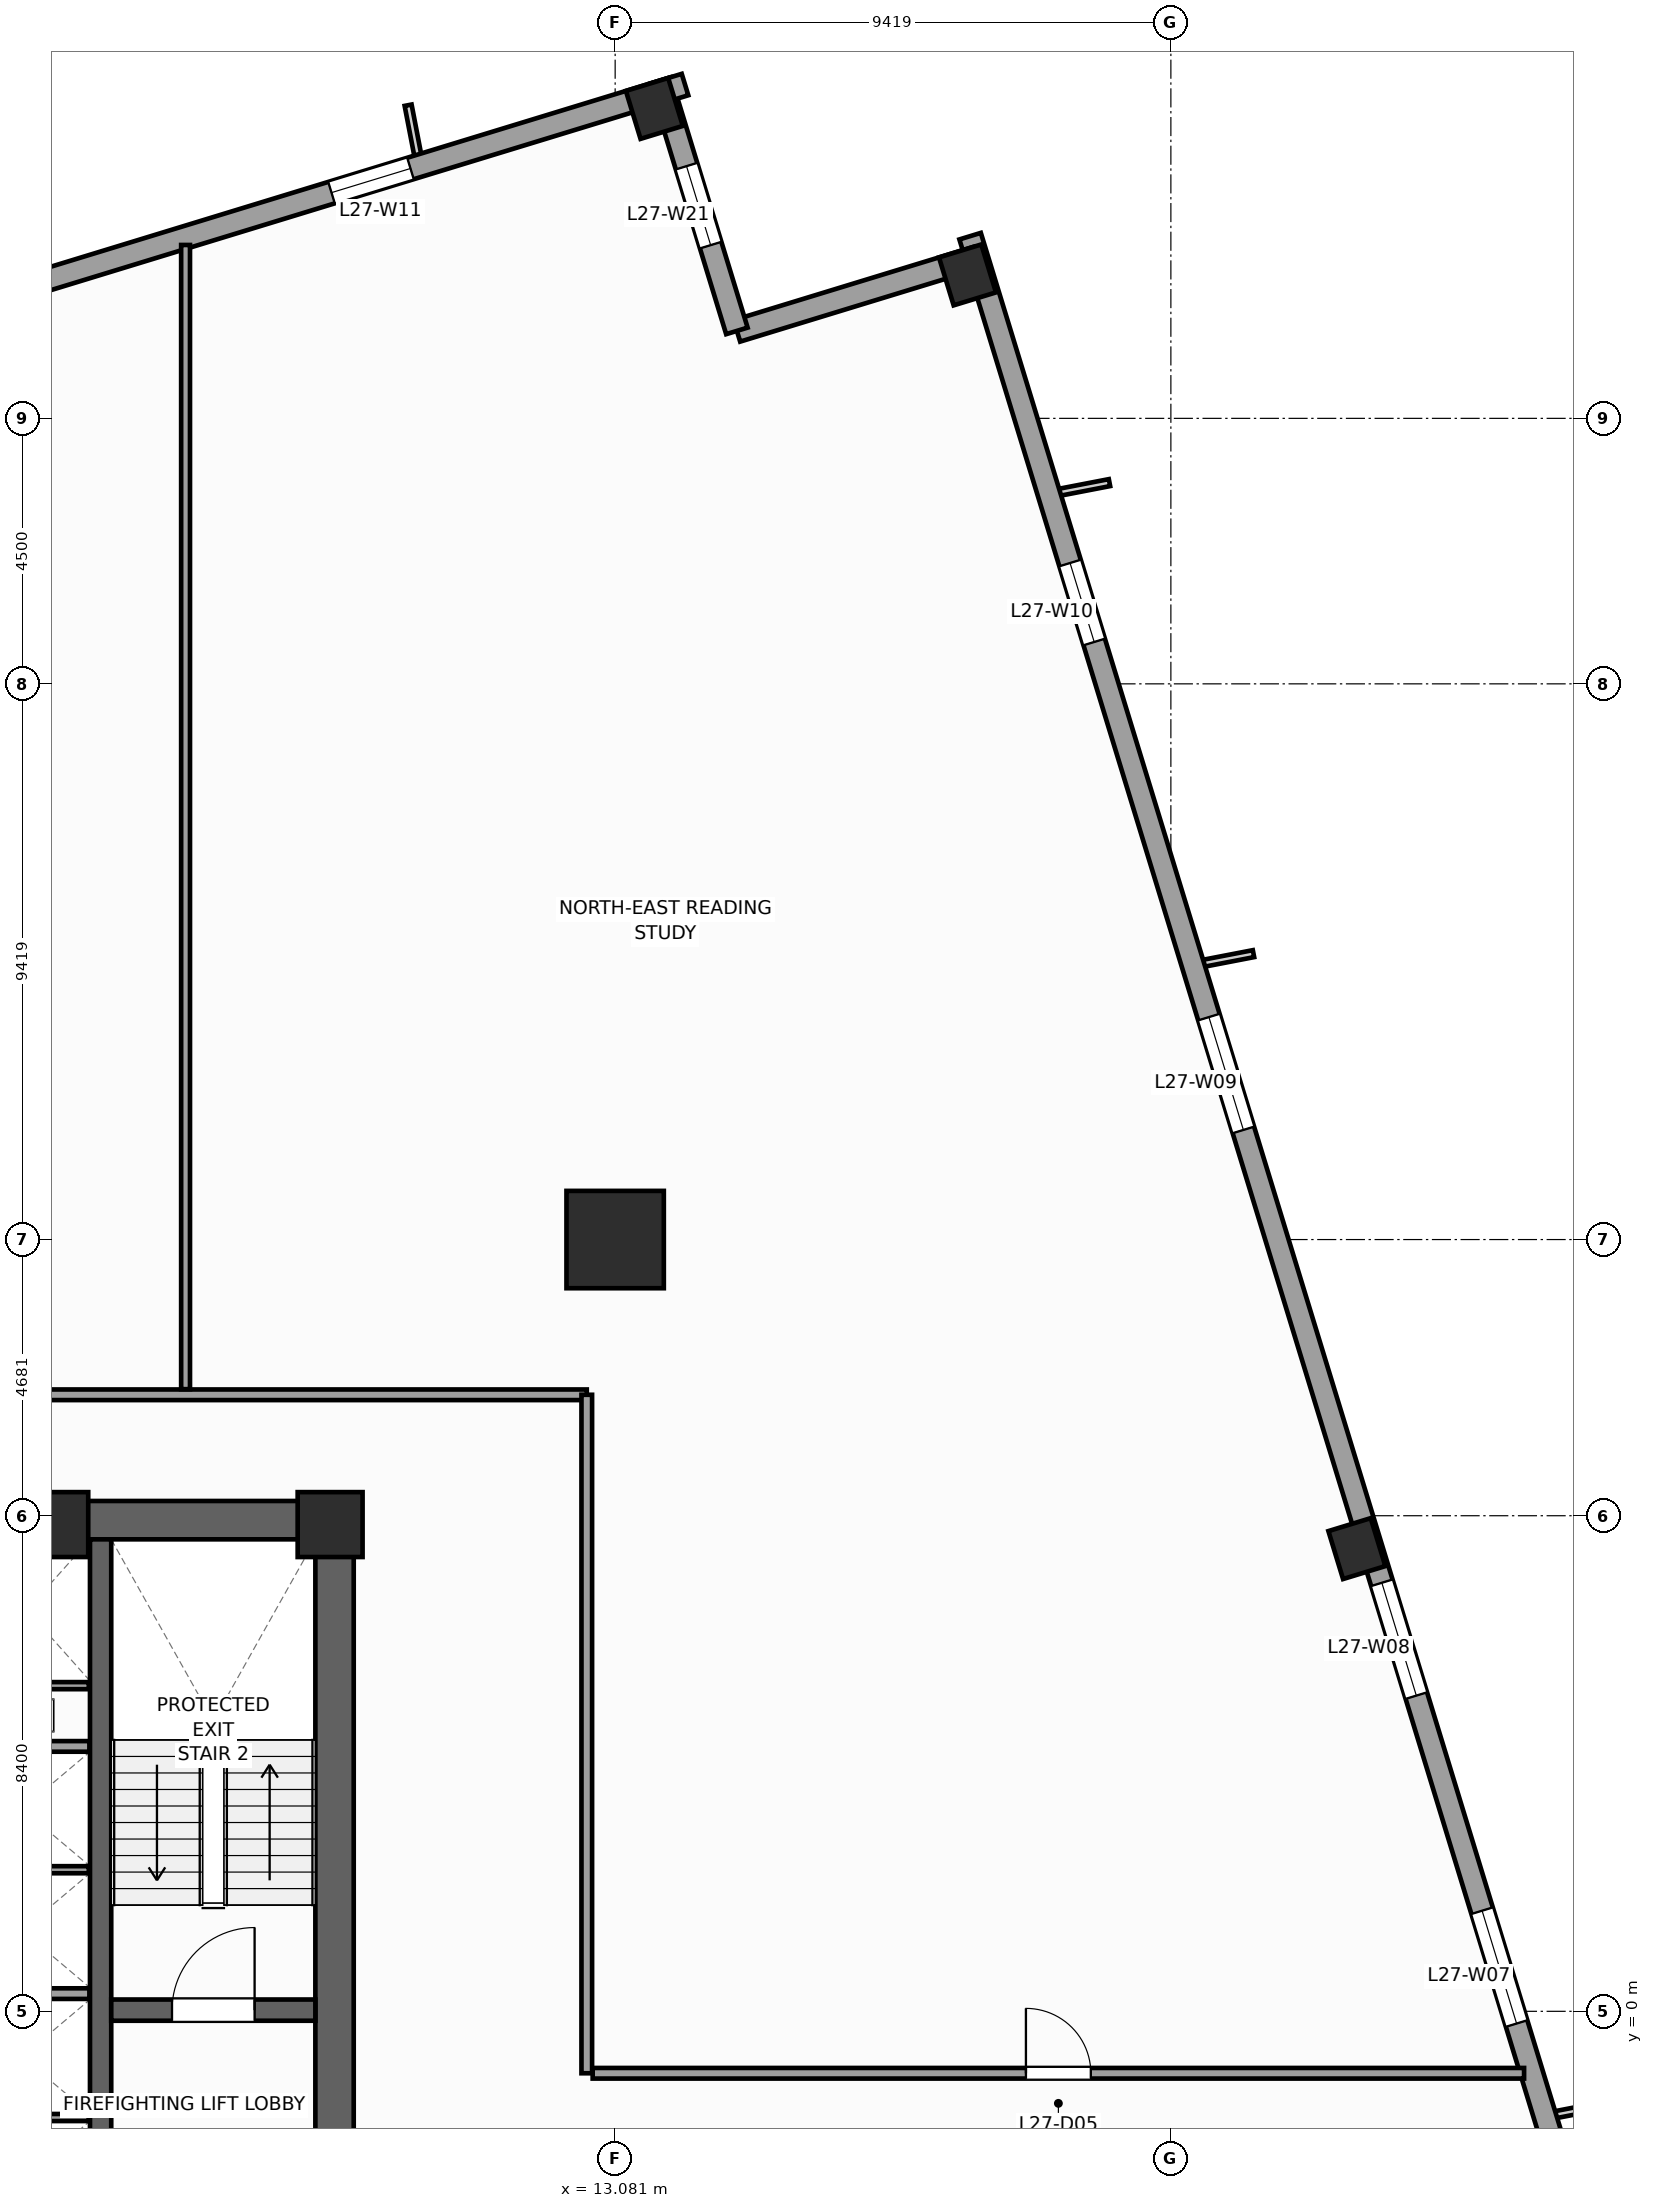
"""IFC4 building model, lengths in metres.
Left out: names, types, materials, properties, quantities, classifications, styles, units other than length and angle.
Written with IfcOpenShell. Run it as: python <this file> out.ifc"""

import sys

from ifc_helpers import new_model, si_unit, direction, frame, frame_2d, origin, origin_2d, place, context, subcontext, project, spatial, rectangle, extrude, source, transform, mapped, element, fill, save


model = new_model("IFC4")
c1 = context("Model", 3, precision=1e-05, world=origin(), true_north=direction((0.0, 1.0)))
c2 = subcontext(c1, "Body", "Model", "MODEL_VIEW")
j1 = project(units=[si_unit("LENGTHUNIT", "METRE"), si_unit("PLANEANGLEUNIT", "RADIAN")], contexts=[c1])
p1 = place(None, origin())
s1 = spatial("IfcSite", under=j1, at=p1, CompositionType="ELEMENT")
p2 = place(p1, origin())
s2 = spatial("IfcBuilding", under=s1, at=p2, CompositionType="ELEMENT")
p3 = place(p2, frame((0.0, 0.0, 115.2)))
s3 = spatial("IfcBuildingStorey", under=s2, at=p3, CompositionType="ELEMENT", Elevation=115.2)
p4 = place(p3, frame((-8.65, 8.325, 0.0), z_axis=(0.0, 0.0, 1.0), x_axis=(1.0, 0.0, 0.0)))
e1 = element("IfcWall", 1, at=p4, inside=s3, PredefinedType="SHEAR", context=c2, shape_type="SweptSolid", body=[
    extrude(rectangle(XDim=17.3, YDim=0.65, at=frame_2d((8.65, 0.0))), origin(), (0.0, 0.0, 1.0), 4.0),
])
p5 = place(p3, frame((8.325, -8.0, 0.0), z_axis=(0.0, 0.0, 1.0), x_axis=(0.0, 1.0, 0.0)))
e2 = element("IfcWall", 2, at=p5, inside=s3, PredefinedType="SHEAR", context=c2, shape_type="SweptSolid", body=[
    extrude(rectangle(XDim=16.0, YDim=0.65, at=frame_2d((8.0, 0.0))), origin(), (0.0, 0.0, 1.0), 4.0),
])
p6 = place(p5, frame((4.69, 0.0, 0.0)))
e3 = element("IfcOpeningElement", 3, at=p6, cuts=e2, PredefinedType="OPENING", context=c2, shape_type="SweptSolid", body=[
    extrude(rectangle(XDim=1.3, YDim=2.2, at=frame_2d((0.65, 1.1))), frame((0.0, 0.335, 0.0), z_axis=(0.0, -1.0, 0.0), x_axis=(1.0, 0.0, 0.0)), (0.0, 0.0, 1.0), 0.67),
])
p7 = place(p3, frame((4.36, -8.0, 0.0), z_axis=(0.0, 0.0, 1.0), x_axis=(0.0, 1.0, 0.0)))
e4 = element("IfcWall", 4, at=p7, inside=s3, PredefinedType="SHEAR", context=c2, shape_type="SweptSolid", body=[
    extrude(rectangle(XDim=16.0, YDim=0.36, at=frame_2d((8.0, 0.0))), origin(), (0.0, 0.0, 1.0), 4.0),
])
p8 = place(p3, frame((4.54, 0.02, 0.0), z_axis=(0.0, 0.0, 1.0), x_axis=(1.0, 0.0, 0.0)))
e5 = element("IfcWall", 5, at=p8, inside=s3, PredefinedType="SHEAR", context=c2, shape_type="SweptSolid", body=[
    extrude(rectangle(XDim=3.46, YDim=0.36, at=frame_2d((1.73, 0.0))), origin(), (0.0, 0.0, 1.0), 4.0),
])
p9 = place(p8, frame((1.03, 0.0, 0.0)))
e6 = element("IfcOpeningElement", 6, at=p9, cuts=e5, PredefinedType="OPENING", context=c2, shape_type="SweptSolid", body=[
    extrude(rectangle(XDim=1.4, YDim=2.2, at=frame_2d((0.7, 1.1))), frame((0.0, 0.19, 0.0), z_axis=(0.0, -1.0, 0.0), x_axis=(1.0, 0.0, 0.0)), (0.0, 0.0, 1.0), 0.38),
])
m1 = source(origin(), c2, "Body", "SweptSolid", [
    extrude(rectangle(XDim=1.1, YDim=1.1, at=origin_2d()), origin(), (0.0, 0.0, 1.0), 4.0),
])
for number, where, z_axis, x_axis in (
    (7, (8.25, 8.25, 0.0), (0.0, 0.0, 1.0), (1.0, 0.0, 0.0)),
    (8, (3.6, 8.25, 0.0), (0.0, 0.0, 1.0), (1.0, 0.0, 0.0)),
):
    element("IfcColumn", number, at=place(p3, frame(where, z_axis=z_axis, x_axis=x_axis)), inside=s3, PredefinedType="PILASTER", context=c2, shape_type="MappedRepresentation", body=[
        mapped(m1, transform((0.0, 0.0, 0.0), scale=1.0)),
    ])
m2 = source(origin(), c2, "Body", "SweptSolid", [
    extrude(rectangle(XDim=1.65, YDim=1.65, at=origin_2d()), origin(), (0.0, 0.0, 1.0), 4.0),
])
p10 = place(p3, frame((13.081, 13.081, 0.0), z_axis=(0.0, 0.0, 1.0), x_axis=(1.0, 0.0, 0.0)))
e9 = element("IfcColumn", 9, at=p10, inside=s3, PredefinedType="COLUMN", context=c2, shape_type="MappedRepresentation", body=[
    mapped(m2, transform((0.0, 0.0, 0.0), scale=1.0)),
])
m3 = source(origin(), c2, "Body", "SweptSolid", [
    extrude(rectangle(XDim=0.75, YDim=0.85, at=origin_2d()), origin(), (0.0, 0.0, 1.0), 4.0),
])
for number, where, z_axis, x_axis in (
    (10, (25.653, 7.843, 0.0), (0.0, 0.0, 1.0), (0.956, 0.292, 0.0)),
    (11, (19.052, 29.431, 0.0), (0.0, 0.0, 1.0), (0.956, 0.292, 0.0)),
    (12, (13.746, 32.253, 0.0), (0.0, 0.0, 1.0), (0.956, 0.292, 0.0)),
):
    element("IfcColumn", number, at=place(p3, frame(where, z_axis=z_axis, x_axis=x_axis)), inside=s3, PredefinedType="COLUMN", context=c2, shape_type="MappedRepresentation", body=[
        mapped(m3, transform((0.0, 0.0, 0.0), scale=1.0)),
    ])
p11 = place(p3, frame((32.658, -14.265, 0.0), z_axis=(0.0, 0.0, 1.0), x_axis=(-0.292373127906, 0.956304320851, 0.0)))
e13 = element("IfcWall", 13, at=p11, inside=s3, PredefinedType="STANDARD", context=c2, shape_type="SweptSolid", body=[
    extrude(rectangle(XDim=46.38, YDim=0.38, at=frame_2d((23.19, 0.0))), origin(), (0.0, 0.0, 1.0), 3.14),
])
p12 = place(p11, frame((4.865, 0.0, 0.51)))
e14 = element("IfcOpeningElement", 14, at=p12, cuts=e13, PredefinedType="OPENING", context=c2, shape_type="SweptSolid", body=[
    extrude(rectangle(XDim=1.4, YDim=2.4, at=frame_2d((0.7, 1.2))), frame((0.0, 0.2, 0.0), z_axis=(0.0, -1.0, 0.0), x_axis=(1.0, 0.0, 0.0)), (0.0, 0.0, 1.0), 0.4),
])
p13 = place(p11, frame((14.7, 0.0, 0.51)))
e15 = element("IfcOpeningElement", 15, at=p13, cuts=e13, PredefinedType="OPENING", context=c2, shape_type="SweptSolid", body=[
    extrude(rectangle(XDim=2.0, YDim=2.4, at=frame_2d((1.0, 1.2))), frame((0.0, 0.2, 0.0), z_axis=(0.0, -1.0, 0.0), x_axis=(1.0, 0.0, 0.0)), (0.0, 0.0, 1.0), 0.4),
])
p14 = place(p11, frame((20.512, 0.0, 0.51)))
e16 = element("IfcOpeningElement", 16, at=p14, cuts=e13, PredefinedType="OPENING", context=c2, shape_type="SweptSolid", body=[
    extrude(rectangle(XDim=2.0, YDim=2.4, at=frame_2d((1.0, 1.2))), frame((0.0, 0.2, 0.0), z_axis=(0.0, -1.0, 0.0), x_axis=(1.0, 0.0, 0.0)), (0.0, 0.0, 1.0), 0.4),
])
p15 = place(p11, frame((30.538, 0.0, 0.51)))
e17 = element("IfcOpeningElement", 17, at=p15, cuts=e13, PredefinedType="OPENING", context=c2, shape_type="SweptSolid", body=[
    extrude(rectangle(XDim=2.0, YDim=2.4, at=frame_2d((1.0, 1.2))), frame((0.0, 0.2, 0.0), z_axis=(0.0, -1.0, 0.0), x_axis=(1.0, 0.0, 0.0)), (0.0, 0.0, 1.0), 0.4),
])
p16 = place(p11, frame((39.187, 0.0, 0.51)))
e18 = element("IfcOpeningElement", 18, at=p16, cuts=e13, PredefinedType="OPENING", context=c2, shape_type="SweptSolid", body=[
    extrude(rectangle(XDim=1.4, YDim=2.4, at=frame_2d((0.7, 1.2))), frame((0.0, 0.2, 0.0), z_axis=(0.0, -1.0, 0.0), x_axis=(1.0, 0.0, 0.0)), (0.0, 0.0, 1.0), 0.4),
])
p17 = place(p3, frame((19.208, 29.725, 0.0), z_axis=(0.0, 0.0, 1.0), x_axis=(-0.956312764915, -0.292345507338, 0.0)))
e19 = element("IfcWall", 19, at=p17, inside=s3, PredefinedType="STANDARD", context=c2, shape_type="SweptSolid", body=[
    extrude(rectangle(XDim=4.25, YDim=0.38, at=frame_2d((2.125, 0.0))), origin(), (0.0, 0.0, 1.0), 3.74),
])
p18 = place(p3, frame((15.144, 28.482, 0.0), z_axis=(0.0, 0.0, 1.0), x_axis=(-0.292373601522, 0.956304176051, 0.0)))
e20 = element("IfcWall", 20, at=p18, inside=s3, PredefinedType="STANDARD", context=c2, shape_type="SweptSolid", body=[
    extrude(rectangle(XDim=4.44, YDim=0.38, at=frame_2d((2.22, 0.0))), origin(), (0.0, 0.0, 1.0), 3.04),
])
p19 = place(p18, frame((1.52, 0.0, 0.51)))
e21 = element("IfcOpeningElement", 21, at=p19, cuts=e20, PredefinedType="OPENING", context=c2, shape_type="SweptSolid", body=[
    extrude(rectangle(XDim=1.4, YDim=2.4, at=frame_2d((0.7, 1.2))), frame((0.0, 0.2, 0.0), z_axis=(0.0, -1.0, 0.0), x_axis=(1.0, 0.0, 0.0)), (0.0, 0.0, 1.0), 0.4),
])
p20 = place(p3, frame((14.265, 32.658, 0.0), z_axis=(0.0, 0.0, 1.0), x_axis=(-0.956304320851, -0.292373127906, 0.0)))
e22 = element("IfcWall", 22, at=p20, inside=s3, PredefinedType="STANDARD", context=c2, shape_type="SweptSolid", body=[
    extrude(rectangle(XDim=46.38, YDim=0.38, at=frame_2d((23.19, 0.0))), origin(), (0.0, 0.0, 1.0), 3.14),
])
p21 = place(p20, frame((17.065, 0.0, 0.0)))
e23 = element("IfcOpeningElement", 23, at=p21, cuts=e22, PredefinedType="OPENING", context=c2, shape_type="SweptSolid", body=[
    extrude(rectangle(XDim=1.05, YDim=2.25, at=frame_2d((0.525, 1.125))), frame((0.0, 0.2, 0.0), z_axis=(0.0, -1.0, 0.0), x_axis=(1.0, 0.0, 0.0)), (0.0, 0.0, 1.0), 0.4),
])
p22 = place(p20, frame((4.865, 0.0, 0.51)))
e24 = element("IfcOpeningElement", 24, at=p22, cuts=e22, PredefinedType="OPENING", context=c2, shape_type="SweptSolid", body=[
    extrude(rectangle(XDim=1.4, YDim=2.4, at=frame_2d((0.7, 1.2))), frame((0.0, 0.2, 0.0), z_axis=(0.0, -1.0, 0.0), x_axis=(1.0, 0.0, 0.0)), (0.0, 0.0, 1.0), 0.4),
])
p23 = place(p20, frame((12.45, 0.0, 0.51)))
e25 = element("IfcOpeningElement", 25, at=p23, cuts=e22, PredefinedType="OPENING", context=c2, shape_type="SweptSolid", body=[
    extrude(rectangle(XDim=2.0, YDim=2.4, at=frame_2d((1.0, 1.2))), frame((0.0, 0.2, 0.0), z_axis=(0.0, -1.0, 0.0), x_axis=(1.0, 0.0, 0.0)), (0.0, 0.0, 1.0), 0.4),
])
p24 = place(p20, frame((30.538, 0.0, 0.51)))
e26 = element("IfcOpeningElement", 26, at=p24, cuts=e22, PredefinedType="OPENING", context=c2, shape_type="SweptSolid", body=[
    extrude(rectangle(XDim=2.0, YDim=2.4, at=frame_2d((1.0, 1.2))), frame((0.0, 0.2, 0.0), z_axis=(0.0, -1.0, 0.0), x_axis=(1.0, 0.0, 0.0)), (0.0, 0.0, 1.0), 0.4),
])
p25 = place(p20, frame((39.187, 0.0, 0.51)))
e27 = element("IfcOpeningElement", 27, at=p25, cuts=e22, PredefinedType="OPENING", context=c2, shape_type="SweptSolid", body=[
    extrude(rectangle(XDim=1.4, YDim=2.4, at=frame_2d((0.7, 1.2))), frame((0.0, 0.2, 0.0), z_axis=(0.0, -1.0, 0.0), x_axis=(1.0, 0.0, 0.0)), (0.0, 0.0, 1.0), 0.4),
])
for number, where, z_axis, x_axis in (
    (28, (1.89, 0.3, 0.0), (0.0, 0.0, 1.0), (1.0, 0.0, 0.0)),
    (29, (1.89, 4.49, 0.0), (0.0, 0.0, 1.0), (1.0, 0.0, 0.0)),
):
    element("IfcWall", number, at=place(p3, frame(where, z_axis=z_axis, x_axis=x_axis)), inside=s3, PredefinedType="PARTITIONING", context=c2, shape_type="SweptSolid", body=[
        extrude(rectangle(XDim=2.28, YDim=0.18, at=frame_2d((1.14, 0.0))), origin(), (0.0, 0.0, 1.0), 3.74),
    ])
for number, where, z_axis, x_axis in (
    (30, (1.9, -1.8, 0.0), (0.0, 0.0, 1.0), (1.0, 0.0, 0.0)),
    (31, (1.9, 2.4, 0.0), (0.0, 0.0, 1.0), (1.0, 0.0, 0.0)),
):
    element("IfcWall", number, at=place(p3, frame(where, z_axis=z_axis, x_axis=x_axis)), inside=s3, PredefinedType="PARTITIONING", context=c2, shape_type="SweptSolid", body=[
        extrude(rectangle(XDim=2.26, YDim=0.12, at=frame_2d((1.13, 0.0))), origin(), (0.0, 0.0, 1.0), 3.74),
    ])
p26 = place(p3, frame((2.06, 5.52, 0.0), z_axis=(0.0, 0.0, 1.0), x_axis=(1.0, 0.0, 0.0)))
e32 = element("IfcWall", 32, at=p26, inside=s3, PredefinedType="PARTITIONING", context=c2, shape_type="SweptSolid", body=[
    extrude(rectangle(XDim=2.1, YDim=0.12, at=frame_2d((1.05, 0.0))), origin(), (0.0, 0.0, 1.0), 3.74),
])
p27 = place(p3, frame((-12.6, 10.45, 0.0), z_axis=(0.0, 0.0, 1.0), x_axis=(1.0, 0.0, 0.0)))
e33 = element("IfcWall", 33, at=p27, inside=s3, PredefinedType="PARTITIONING", context=c2, shape_type="SweptSolid", body=[
    extrude(rectangle(XDim=25.2, YDim=0.18, at=frame_2d((12.6, 0.0))), origin(), (0.0, 0.0, 1.0), 3.74),
])
p28 = place(p27, frame((5.014, 0.0, 0.0)))
e34 = element("IfcOpeningElement", 34, at=p28, cuts=e33, PredefinedType="OPENING", context=c2, shape_type="SweptSolid", body=[
    extrude(rectangle(XDim=0.95, YDim=2.1, at=frame_2d((0.475, 1.05))), frame((0.0, 0.1, 0.0), z_axis=(0.0, -1.0, 0.0), x_axis=(1.0, 0.0, 0.0)), (0.0, 0.0, 1.0), 0.2),
])
p29 = place(p27, frame((2.59, 0.0, 0.0)))
e35 = element("IfcOpeningElement", 35, at=p29, cuts=e33, PredefinedType="OPENING", context=c2, shape_type="SweptSolid", body=[
    extrude(rectangle(XDim=0.95, YDim=2.1, at=frame_2d((0.475, 1.05))), frame((0.0, 0.1, 0.0), z_axis=(0.0, -1.0, 0.0), x_axis=(1.0, 0.0, 0.0)), (0.0, 0.0, 1.0), 0.2),
])
p30 = place(p27, frame((12.05, 0.0, 0.0)))
e36 = element("IfcOpeningElement", 36, at=p30, cuts=e33, PredefinedType="OPENING", context=c2, shape_type="SweptSolid", body=[
    extrude(rectangle(XDim=1.1, YDim=2.2, at=frame_2d((0.55, 1.1))), frame((0.0, 0.1, 0.0), z_axis=(0.0, -1.0, 0.0), x_axis=(1.0, 0.0, 0.0)), (0.0, 0.0, 1.0), 0.2),
])
p31 = place(p3, frame((12.6, -1.05, 0.0), z_axis=(0.0, 0.0, 1.0), x_axis=(0.0, 1.0, 0.0)))
e37 = element("IfcWall", 37, at=p31, inside=s3, PredefinedType="PARTITIONING", context=c2, shape_type="SweptSolid", body=[
    extrude(rectangle(XDim=11.5, YDim=0.18, at=frame_2d((5.75, 0.0))), origin(), (0.0, 0.0, 1.0), 3.74),
])
p32 = place(p3, frame((12.7, -1.05, 0.0), z_axis=(0.0, 0.0, 1.0), x_axis=(1.0, 0.0, 0.0)))
e38 = element("IfcWall", 38, at=p32, inside=s3, PredefinedType="PARTITIONING", context=c2, shape_type="SweptSolid", body=[
    extrude(rectangle(XDim=15.787, YDim=0.18, at=frame_2d((7.894, 0.0))), origin(), (0.0, 0.0, 1.0), 3.74),
])
p33 = place(p32, frame((7.343, 0.0, 0.0)))
e39 = element("IfcOpeningElement", 39, at=p33, cuts=e38, PredefinedType="OPENING", context=c2, shape_type="SweptSolid", body=[
    extrude(rectangle(XDim=1.1, YDim=2.2, at=frame_2d((0.55, 1.1))), frame((0.0, 0.1, 0.0), z_axis=(0.0, -1.0, 0.0), x_axis=(1.0, 0.0, 0.0)), (0.0, 0.0, 1.0), 0.2),
])
p34 = place(p3, frame((5.8, 10.545, 0.0), z_axis=(0.0, 0.0, 1.0), x_axis=(0.0, 1.0, 0.0)))
e40 = element("IfcWall", 40, at=p34, inside=s3, PredefinedType="PARTITIONING", context=c2, shape_type="SweptSolid", body=[
    extrude(rectangle(XDim=19.394, YDim=0.15, at=frame_2d((9.697, 0.0))), origin(), (0.0, 0.0, 1.0), 3.74),
])
m4 = source(origin(), c2, "Body", "SweptSolid", [
    extrude(rectangle(XDim=2.0, YDim=2.4, at=frame_2d((1.0, 1.2))), frame((0.0, 0.03, 0.0), z_axis=(0.0, -1.0, 0.0), x_axis=(1.0, 0.0, 0.0)), (0.0, 0.0, 1.0), 0.06),
])
p35 = place(p13, origin())
e41 = element("IfcWindow", 41, at=p35, inside=s3, PartitioningType="SINGLE_PANEL", PredefinedType="WINDOW", context=c2, shape_type="MappedRepresentation", body=[
    mapped(m4, transform((0.0, 0.0, 0.0), scale=1.0)),
])
fill(e15, e41)
p36 = place(p14, origin())
e42 = element("IfcWindow", 42, at=p36, inside=s3, PartitioningType="SINGLE_PANEL", PredefinedType="WINDOW", context=c2, shape_type="MappedRepresentation", body=[
    mapped(m4, transform((0.0, 0.0, 0.0), scale=1.0)),
])
fill(e16, e42)
p37 = place(p15, origin())
e43 = element("IfcWindow", 43, at=p37, inside=s3, PartitioningType="SINGLE_PANEL", PredefinedType="WINDOW", context=c2, shape_type="MappedRepresentation", body=[
    mapped(m4, transform((0.0, 0.0, 0.0), scale=1.0)),
])
fill(e17, e43)
m5 = source(origin(), c2, "Body", "SweptSolid", [
    extrude(rectangle(XDim=1.4, YDim=2.4, at=frame_2d((0.7, 1.2))), frame((0.0, 0.03, 0.0), z_axis=(0.0, -1.0, 0.0), x_axis=(1.0, 0.0, 0.0)), (0.0, 0.0, 1.0), 0.06),
])
p38 = place(p16, origin())
e44 = element("IfcWindow", 44, at=p38, inside=s3, PartitioningType="SINGLE_PANEL", PredefinedType="WINDOW", context=c2, shape_type="MappedRepresentation", body=[
    mapped(m5, transform((0.0, 0.0, 0.0), scale=1.0)),
])
fill(e18, e44)
p39 = place(p22, origin())
e45 = element("IfcWindow", 45, at=p39, inside=s3, PartitioningType="SINGLE_PANEL", PredefinedType="WINDOW", context=c2, shape_type="MappedRepresentation", body=[
    mapped(m5, transform((0.0, 0.0, 0.0), scale=1.0)),
])
fill(e24, e45)
p40 = place(p19, origin())
e46 = element("IfcWindow", 46, at=p40, inside=s3, PartitioningType="SINGLE_PANEL", PredefinedType="WINDOW", context=c2, shape_type="MappedRepresentation", body=[
    mapped(m5, transform((0.0, 0.0, 0.0), scale=1.0)),
])
fill(e21, e46)
m6 = source(origin(), c2, "Body", "SweptSolid", [
    extrude(rectangle(XDim=1.4, YDim=2.2, at=frame_2d((0.7, 1.1))), frame((0.0, 0.025, 0.0), z_axis=(0.0, -1.0, 0.0), x_axis=(1.0, 0.0, 0.0)), (0.0, 0.0, 1.0), 0.05),
])
p41 = place(p9, origin())
e47 = element("IfcDoor", 47, at=p41, inside=s3, OperationType="SINGLE_SWING_RIGHT", PredefinedType="DOOR", context=c2, shape_type="MappedRepresentation", body=[
    mapped(m6, transform((0.0, 0.0, 0.0), scale=1.0)),
])
fill(e6, e47)
m7 = source(origin(), c2, "Body", "SweptSolid", [
    extrude(rectangle(XDim=1.1, YDim=2.2, at=frame_2d((0.55, 1.1))), frame((0.0, 0.025, 0.0), z_axis=(0.0, -1.0, 0.0), x_axis=(1.0, 0.0, 0.0)), (0.0, 0.0, 1.0), 0.05),
])
p42 = place(p33, origin())
e48 = element("IfcDoor", 48, at=p42, inside=s3, OperationType="SINGLE_SWING_LEFT", PredefinedType="DOOR", context=c2, shape_type="MappedRepresentation", body=[
    mapped(m7, transform((0.0, 0.0, 0.0), scale=1.0)),
])
fill(e39, e48)
save(model, sys.argv[1])
